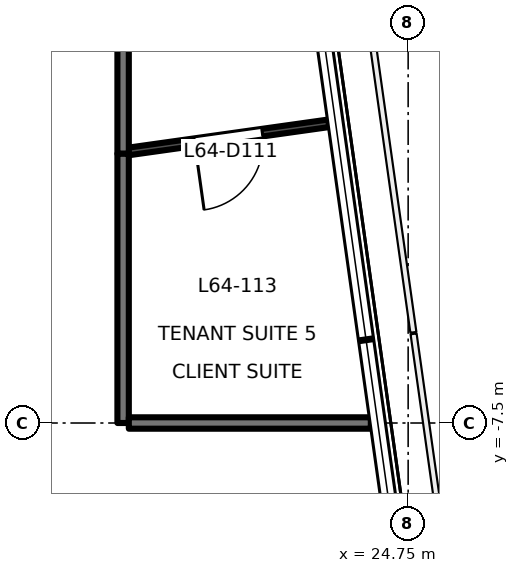
"""IFC4 building model, lengths in metres.
Left out: names, types, materials, properties, quantities, classifications, styles, units other than length and angle.
Written with IfcOpenShell. Run it as: python <this file> out.ifc"""

import sys

from ifc_helpers import new_model, si_unit, direction, frame, frame_2d, origin, place, context, subcontext, project, spatial, rectangle, extrude, element, fill, save


model = new_model("IFC4")
c1 = context("Model", 3, precision=1e-05, world=origin(), true_north=direction((0.0, 1.0)))
c2 = subcontext(c1, "Body", "Model", "MODEL_VIEW")
j1 = project(units=[si_unit("LENGTHUNIT", "METRE"), si_unit("PLANEANGLEUNIT", "RADIAN")], contexts=[c1])
p1 = place(None, origin())
s1 = spatial("IfcSite", under=j1, at=p1, CompositionType="ELEMENT")
p2 = place(p1, origin())
s2 = spatial("IfcBuilding", under=s1, at=p2, CompositionType="ELEMENT")
p3 = place(p2, frame((0.0, 0.0, 278.5)))
s3 = spatial("IfcBuildingStorey", under=s2, at=p3, CompositionType="ELEMENT", Elevation=278.5)
p4 = place(p3, frame((21.0, 5.5, 0.0), z_axis=(0.0, 0.0, 1.0), x_axis=(0.0, -1.0, 0.0)))
e1 = element("IfcWall", 1, at=p4, inside=s3, PredefinedType="PARTITIONING", context=c2, shape_type="SweptSolid", body=[
    extrude(rectangle(XDim=9.458, YDim=0.15, at=frame_2d((4.729, 0.0))), origin(), (0.0, 0.0, 1.0), 3.4),
])
p5 = place(p4, frame((2.115, 0.0, 0.0)))
e2 = element("IfcOpeningElement", 2, at=p5, cuts=e1, PredefinedType="OPENING", context=c2, shape_type="SweptSolid", body=[
    extrude(rectangle(XDim=1.5, YDim=2.1, at=frame_2d((0.75, 1.05))), frame((0.0, 0.085, 0.0), z_axis=(0.0, -1.0, 0.0), x_axis=(1.0, 0.0, 0.0)), (0.0, 0.0, 1.0), 0.171),
])
p6 = place(p3, frame((21.0, -3.958, 0.0), z_axis=(0.0, 0.0, 1.0), x_axis=(0.0, -1.0, 0.0)))
e3 = element("IfcWall", 3, at=p6, inside=s3, PredefinedType="PARTITIONING", context=c2, shape_type="SweptSolid", body=[
    extrude(rectangle(XDim=3.542, YDim=0.15, at=frame_2d((1.771, 0.0))), origin(), (0.0, 0.0, 1.0), 3.4),
])
p7 = place(p3, frame((21.075, -7.5, 0.0), z_axis=(0.0, 0.0, 1.0), x_axis=(1.0, 0.0, 0.0)))
e4 = element("IfcWall", 4, at=p7, inside=s3, PredefinedType="PARTITIONING", context=c2, shape_type="SweptSolid", body=[
    extrude(rectangle(XDim=3.184, YDim=0.15, at=frame_2d((1.592, 0.0))), origin(), (0.0, 0.0, 1.0), 3.7),
])
p8 = place(p3, frame((23.705, -3.557, 0.0), z_axis=(0.0, 0.0, 1.0), x_axis=(-0.990242548456, -0.139354566582, 0.0)))
e5 = element("IfcWall", 5, at=p8, inside=s3, PredefinedType="PARTITIONING", context=c2, shape_type="SweptSolid", body=[
    extrude(rectangle(XDim=2.663, YDim=0.1, at=frame_2d((1.332, 0.0))), origin(), (0.0, 0.0, 1.0), 3.7),
])
p9 = place(p8, frame((0.882, 0.0, 0.0)))
e6 = element("IfcOpeningElement", 6, at=p9, cuts=e5, PredefinedType="OPENING", context=c2, shape_type="SweptSolid", body=[
    extrude(rectangle(XDim=0.9, YDim=2.1, at=frame_2d((0.45, 1.05))), frame((0.0, 0.061, 0.0), z_axis=(0.0, -1.0, 0.0), x_axis=(1.0, 0.0, 0.0)), (0.0, 0.0, 1.0), 0.121),
])
p10 = place(p9, origin())
e7 = element("IfcDoor", 7, at=p10, inside=s3, OperationType="SINGLE_SWING_RIGHT", PredefinedType="DOOR", context=c2, shape_type="SweptSolid", body=[
    extrude(rectangle(XDim=0.9, YDim=2.1, at=frame_2d((0.45, 1.05))), frame((0.0, 0.025, 0.0), z_axis=(0.0, -1.0, 0.0), x_axis=(1.0, 0.0, 0.0)), (0.0, 0.0, 1.0), 0.05),
])
fill(e6, e7)
save(model, sys.argv[1])
